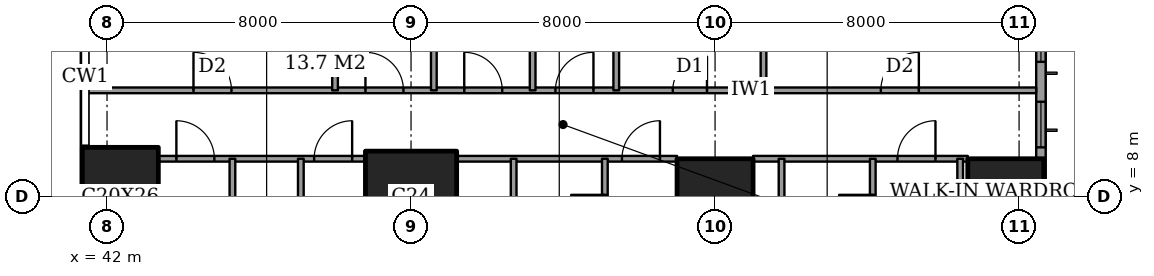
"""IFC4 building model, lengths in metres.
Left out: names, types, materials, properties, quantities, classifications, styles, units other than length and angle.
Written with IfcOpenShell. Run it as: python <this file> out.ifc"""

import sys

from ifc_helpers import new_model, si_unit, direction, frame, frame_2d, origin, origin_2d, place, context, subcontext, project, spatial, rectangle, extrude, element, fill, save


model = new_model("IFC4")
c1 = context("Model", 3, precision=1e-05, world=origin(), true_north=direction((0.0, 1.0)))
c2 = subcontext(c1, "Body", "Model", "MODEL_VIEW")
j1 = project(units=[si_unit("LENGTHUNIT", "METRE"), si_unit("PLANEANGLEUNIT", "RADIAN")], contexts=[c1])
p1 = place(None, origin())
s1 = spatial("IfcSite", under=j1, at=p1, CompositionType="ELEMENT")
p2 = place(p1, origin())
s2 = spatial("IfcBuilding", under=s1, at=p2, CompositionType="ELEMENT")
p3 = place(p2, frame((0.0, 0.0, 54.8)))
s3 = spatial("IfcBuildingStorey", under=s2, at=p3, CompositionType="ELEMENT", Elevation=54.8)
p4 = place(p3, frame((42.35, 8.0, 0.0), z_axis=(0.0, 0.0, 1.0), x_axis=(1.0, 0.0, 0.0)))
e1 = element("IfcColumn", 1, at=p4, inside=s3, PredefinedType="COLUMN", context=c2, shape_type="SweptSolid", body=[
    extrude(rectangle(XDim=2.0, YDim=2.6, at=origin_2d()), origin(), (0.0, 0.0, 1.0), 3.6),
])
p5 = place(p3, frame((50.0, 8.0, 0.0), z_axis=(0.0, 0.0, 1.0), x_axis=(1.0, 0.0, 0.0)))
e2 = element("IfcColumn", 2, at=p5, inside=s3, PredefinedType="COLUMN", context=c2, shape_type="SweptSolid", body=[
    extrude(rectangle(XDim=2.4, YDim=2.4, at=origin_2d()), origin(), (0.0, 0.0, 1.0), 3.6),
])
for number, where, z_axis, x_axis in (
    (3, (58.0, 8.0, 0.0), (0.0, 0.0, 1.0), (1.0, 0.0, 0.0)),
    (4, (65.65, 8.0, 0.0), (0.0, 0.0, 1.0), (1.0, 0.0, 0.0)),
):
    element("IfcColumn", number, at=place(p3, frame(where, z_axis=z_axis, x_axis=x_axis)), inside=s3, PredefinedType="COLUMN", context=c2, shape_type="SweptSolid", body=[
        extrude(rectangle(XDim=2.0, YDim=2.0, at=origin_2d()), origin(), (0.0, 0.0, 1.0), 3.6),
    ])
p6 = place(p3, frame((66.575, 3.175, 0.0), z_axis=(0.0, 0.0, 1.0), x_axis=(0.0, 1.0, 0.0)))
e5 = element("IfcWall", 5, at=p6, inside=s3, PredefinedType="SOLIDWALL", context=c2, shape_type="SweptSolid", body=[
    extrude(rectangle(XDim=41.65, YDim=0.25, at=frame_2d((20.825, 0.0))), origin(), (0.0, 0.0, 1.0), 3.6),
])
p7 = place(p6, frame((0.775, 0.0, 0.6)))
e6 = element("IfcOpeningElement", 6, at=p7, cuts=e5, PredefinedType="OPENING", context=c2, shape_type="SweptSolid", body=[
    extrude(rectangle(XDim=2.4, YDim=2.0, at=frame_2d((1.2, 1.0))), frame((0.0, 0.135, 0.0), z_axis=(0.0, -1.0, 0.0), x_axis=(1.0, 0.0, 0.0)), (0.0, 0.0, 1.0), 0.27),
])
p8 = place(p6, frame((6.125, 0.0, 0.6)))
e7 = element("IfcOpeningElement", 7, at=p8, cuts=e5, PredefinedType="OPENING", context=c2, shape_type="SweptSolid", body=[
    extrude(rectangle(XDim=1.2, YDim=2.0, at=frame_2d((0.6, 1.0))), frame((0.0, 0.135, 0.0), z_axis=(0.0, -1.0, 0.0), x_axis=(1.0, 0.0, 0.0)), (0.0, 0.0, 1.0), 0.27),
])
p9 = place(p6, frame((8.375, 0.0, 0.6)))
e8 = element("IfcOpeningElement", 8, at=p9, cuts=e5, PredefinedType="OPENING", context=c2, shape_type="SweptSolid", body=[
    extrude(rectangle(XDim=2.4, YDim=2.0, at=frame_2d((1.2, 1.0))), frame((0.0, 0.135, 0.0), z_axis=(0.0, -1.0, 0.0), x_axis=(1.0, 0.0, 0.0)), (0.0, 0.0, 1.0), 0.27),
])
p10 = place(p6, frame((15.775, 0.0, 0.6)))
e9 = element("IfcOpeningElement", 9, at=p10, cuts=e5, PredefinedType="OPENING", context=c2, shape_type="SweptSolid", body=[
    extrude(rectangle(XDim=2.4, YDim=2.0, at=frame_2d((1.2, 1.0))), frame((0.0, 0.135, 0.0), z_axis=(0.0, -1.0, 0.0), x_axis=(1.0, 0.0, 0.0)), (0.0, 0.0, 1.0), 0.27),
])
p11 = place(p6, frame((23.475, 0.0, 0.6)))
e10 = element("IfcOpeningElement", 10, at=p11, cuts=e5, PredefinedType="OPENING", context=c2, shape_type="SweptSolid", body=[
    extrude(rectangle(XDim=2.4, YDim=2.0, at=frame_2d((1.2, 1.0))), frame((0.0, 0.135, 0.0), z_axis=(0.0, -1.0, 0.0), x_axis=(1.0, 0.0, 0.0)), (0.0, 0.0, 1.0), 0.27),
])
p12 = place(p6, frame((30.775, 0.0, 0.6)))
e11 = element("IfcOpeningElement", 11, at=p12, cuts=e5, PredefinedType="OPENING", context=c2, shape_type="SweptSolid", body=[
    extrude(rectangle(XDim=2.4, YDim=2.0, at=frame_2d((1.2, 1.0))), frame((0.0, 0.135, 0.0), z_axis=(0.0, -1.0, 0.0), x_axis=(1.0, 0.0, 0.0)), (0.0, 0.0, 1.0), 0.27),
])
p13 = place(p6, frame((34.125, 0.0, 0.6)))
e12 = element("IfcOpeningElement", 12, at=p13, cuts=e5, PredefinedType="OPENING", context=c2, shape_type="SweptSolid", body=[
    extrude(rectangle(XDim=1.2, YDim=2.0, at=frame_2d((0.6, 1.0))), frame((0.0, 0.135, 0.0), z_axis=(0.0, -1.0, 0.0), x_axis=(1.0, 0.0, 0.0)), (0.0, 0.0, 1.0), 0.27),
])
p14 = place(p6, frame((38.475, 0.0, 0.6)))
e13 = element("IfcOpeningElement", 13, at=p14, cuts=e5, PredefinedType="OPENING", context=c2, shape_type="SweptSolid", body=[
    extrude(rectangle(XDim=2.4, YDim=2.0, at=frame_2d((1.2, 1.0))), frame((0.0, 0.135, 0.0), z_axis=(0.0, -1.0, 0.0), x_axis=(1.0, 0.0, 0.0)), (0.0, 0.0, 1.0), 0.27),
])
p15 = place(p3, frame((43.35, 9.0, 0.0), z_axis=(0.0, 0.0, 1.0), x_axis=(1.0, 0.0, 0.0)))
e14 = element("IfcWall", 14, at=p15, inside=s3, PredefinedType="PARTITIONING", context=c2, shape_type="SweptSolid", body=[
    extrude(rectangle(XDim=5.45, YDim=0.15, at=frame_2d((2.725, 0.0))), origin(), (0.0, 0.0, 1.0), 3.35),
])
p16 = place(p15, frame((4.1, 0.0, 0.0)))
e15 = element("IfcOpeningElement", 15, at=p16, cuts=e14, PredefinedType="OPENING", context=c2, shape_type="SweptSolid", body=[
    extrude(rectangle(XDim=1.0, YDim=2.1, at=frame_2d((0.5, 1.05))), frame((0.0, 0.085, 0.0), z_axis=(0.0, -1.0, 0.0), x_axis=(1.0, 0.0, 0.0)), (0.0, 0.0, 1.0), 0.17),
])
p17 = place(p15, frame((0.475, 0.0, 0.0)))
e16 = element("IfcOpeningElement", 16, at=p17, cuts=e14, PredefinedType="OPENING", context=c2, shape_type="SweptSolid", body=[
    extrude(rectangle(XDim=1.0, YDim=2.1, at=frame_2d((0.5, 1.05))), frame((0.0, 0.085, 0.0), z_axis=(0.0, -1.0, 0.0), x_axis=(1.0, 0.0, 0.0)), (0.0, 0.0, 1.0), 0.17),
])
p18 = place(p3, frame((51.2, 9.0, 0.0), z_axis=(0.0, 0.0, 1.0), x_axis=(1.0, 0.0, 0.0)))
e17 = element("IfcWall", 17, at=p18, inside=s3, PredefinedType="PARTITIONING", context=c2, shape_type="SweptSolid", body=[
    extrude(rectangle(XDim=5.8, YDim=0.15, at=frame_2d((2.9, 0.0))), origin(), (0.0, 0.0, 1.0), 3.35),
])
p19 = place(p18, frame((4.35, 0.0, 0.0)))
e18 = element("IfcOpeningElement", 18, at=p19, cuts=e17, PredefinedType="OPENING", context=c2, shape_type="SweptSolid", body=[
    extrude(rectangle(XDim=1.0, YDim=2.1, at=frame_2d((0.5, 1.05))), frame((0.0, 0.085, 0.0), z_axis=(0.0, -1.0, 0.0), x_axis=(1.0, 0.0, 0.0)), (0.0, 0.0, 1.0), 0.17),
])
p20 = place(p3, frame((59.0, 9.0, 0.0), z_axis=(0.0, 0.0, 1.0), x_axis=(1.0, 0.0, 0.0)))
e19 = element("IfcWall", 19, at=p20, inside=s3, PredefinedType="PARTITIONING", context=c2, shape_type="SweptSolid", body=[
    extrude(rectangle(XDim=5.65, YDim=0.15, at=frame_2d((2.825, 0.0))), origin(), (0.0, 0.0, 1.0), 3.35),
])
p21 = place(p20, frame((3.8, 0.0, 0.0)))
e20 = element("IfcOpeningElement", 20, at=p21, cuts=e19, PredefinedType="OPENING", context=c2, shape_type="SweptSolid", body=[
    extrude(rectangle(XDim=1.0, YDim=2.1, at=frame_2d((0.5, 1.05))), frame((0.0, 0.085, 0.0), z_axis=(0.0, -1.0, 0.0), x_axis=(1.0, 0.0, 0.0)), (0.0, 0.0, 1.0), 0.17),
])
p22 = place(p3, frame((41.439, 10.8, 0.0), z_axis=(0.0, 0.0, 1.0), x_axis=(1.0, 0.0, 0.0)))
e21 = element("IfcWall", 21, at=p22, inside=s3, PredefinedType="PARTITIONING", context=c2, shape_type="SweptSolid", body=[
    extrude(rectangle(XDim=25.011, YDim=0.15, at=frame_2d((12.505, 0.0))), origin(), (0.0, 0.0, 1.0), 3.35),
])
p23 = place(p22, frame((12.361, 0.0, 0.0)))
e22 = element("IfcOpeningElement", 22, at=p23, cuts=e21, PredefinedType="OPENING", context=c2, shape_type="SweptSolid", body=[
    extrude(rectangle(XDim=1.0, YDim=2.1, at=frame_2d((0.5, 1.05))), frame((0.0, 0.085, 0.0), z_axis=(0.0, -1.0, 0.0), x_axis=(1.0, 0.0, 0.0)), (0.0, 0.0, 1.0), 0.17),
])
p24 = place(p22, frame((20.924, 0.0, 0.0)))
e23 = element("IfcOpeningElement", 23, at=p24, cuts=e21, PredefinedType="OPENING", context=c2, shape_type="SweptSolid", body=[
    extrude(rectangle(XDim=1.0, YDim=2.1, at=frame_2d((0.5, 1.05))), frame((0.0, 0.085, 0.0), z_axis=(0.0, -1.0, 0.0), x_axis=(1.0, 0.0, 0.0)), (0.0, 0.0, 1.0), 0.17),
])
p25 = place(p22, frame((15.448, 0.0, 0.0)))
e24 = element("IfcOpeningElement", 24, at=p25, cuts=e21, PredefinedType="OPENING", context=c2, shape_type="SweptSolid", body=[
    extrude(rectangle(XDim=0.9, YDim=2.1, at=frame_2d((0.45, 1.05))), frame((0.0, 0.085, 0.0), z_axis=(0.0, -1.0, 0.0), x_axis=(1.0, 0.0, 0.0)), (0.0, 0.0, 1.0), 0.17),
])
p26 = place(p22, frame((9.961, 0.0, 0.0)))
e25 = element("IfcOpeningElement", 25, at=p26, cuts=e21, PredefinedType="OPENING", context=c2, shape_type="SweptSolid", body=[
    extrude(rectangle(XDim=1.0, YDim=2.1, at=frame_2d((0.5, 1.05))), frame((0.0, 0.085, 0.0), z_axis=(0.0, -1.0, 0.0), x_axis=(1.0, 0.0, 0.0)), (0.0, 0.0, 1.0), 0.17),
])
p27 = place(p22, frame((7.361, 0.0, 0.0)))
e26 = element("IfcOpeningElement", 26, at=p27, cuts=e21, PredefinedType="OPENING", context=c2, shape_type="SweptSolid", body=[
    extrude(rectangle(XDim=1.0, YDim=2.1, at=frame_2d((0.5, 1.05))), frame((0.0, 0.085, 0.0), z_axis=(0.0, -1.0, 0.0), x_axis=(1.0, 0.0, 0.0)), (0.0, 0.0, 1.0), 0.17),
])
p28 = place(p22, frame((2.836, 0.0, 0.0)))
e27 = element("IfcOpeningElement", 27, at=p28, cuts=e21, PredefinedType="OPENING", context=c2, shape_type="SweptSolid", body=[
    extrude(rectangle(XDim=1.0, YDim=2.1, at=frame_2d((0.5, 1.05))), frame((0.0, 0.085, 0.0), z_axis=(0.0, -1.0, 0.0), x_axis=(1.0, 0.0, 0.0)), (0.0, 0.0, 1.0), 0.17),
])
p29 = place(p3, frame((45.3, -0.45, 0.0), z_axis=(0.0, 0.0, 1.0), x_axis=(0.0, 1.0, 0.0)))
e28 = element("IfcWall", 28, at=p29, inside=s3, PredefinedType="PARTITIONING", context=c2, shape_type="SweptSolid", body=[
    extrude(rectangle(XDim=9.45, YDim=0.15, at=frame_2d((4.725, 0.0))), origin(), (0.0, 0.0, 1.0), 3.35),
])
p30 = place(p3, frame((47.1, 5.2, 0.0), z_axis=(0.0, 0.0, 1.0), x_axis=(0.0, 1.0, 0.0)))
e29 = element("IfcWall", 29, at=p30, inside=s3, PredefinedType="PARTITIONING", context=c2, shape_type="SweptSolid", body=[
    extrude(rectangle(XDim=3.8, YDim=0.15, at=frame_2d((1.9, 0.0))), origin(), (0.0, 0.0, 1.0), 3.35),
])
p31 = place(p30, frame((1.45, 0.0, 0.0)))
e30 = element("IfcOpeningElement", 30, at=p31, cuts=e29, PredefinedType="OPENING", context=c2, shape_type="SweptSolid", body=[
    extrude(rectangle(XDim=0.9, YDim=2.1, at=frame_2d((0.45, 1.05))), frame((0.0, 0.085, 0.0), z_axis=(0.0, -1.0, 0.0), x_axis=(1.0, 0.0, 0.0)), (0.0, 0.0, 1.0), 0.17),
])
p32 = place(p3, frame((48.0, 10.8, 0.0), z_axis=(0.0, 0.0, 1.0), x_axis=(0.0, 1.0, 0.0)))
e31 = element("IfcWall", 31, at=p32, inside=s3, PredefinedType="PARTITIONING", context=c2, shape_type="SweptSolid", body=[
    extrude(rectangle(XDim=6.7, YDim=0.15, at=frame_2d((3.35, 0.0))), origin(), (0.0, 0.0, 1.0), 3.35),
])
p33 = place(p3, frame((50.6, 10.8, 0.0), z_axis=(0.0, 0.0, 1.0), x_axis=(0.0, 1.0, 0.0)))
e32 = element("IfcWall", 32, at=p33, inside=s3, PredefinedType="PARTITIONING", context=c2, shape_type="SweptSolid", body=[
    extrude(rectangle(XDim=4.0, YDim=0.15, at=frame_2d((2.0, 0.0))), origin(), (0.0, 0.0, 1.0), 3.35),
])
p34 = place(p3, frame((52.7, -0.45, 0.0), z_axis=(0.0, 0.0, 1.0), x_axis=(0.0, 1.0, 0.0)))
e33 = element("IfcWall", 33, at=p34, inside=s3, PredefinedType="PARTITIONING", context=c2, shape_type="SweptSolid", body=[
    extrude(rectangle(XDim=9.45, YDim=0.15, at=frame_2d((4.725, 0.0))), origin(), (0.0, 0.0, 1.0), 3.35),
])
p35 = place(p34, frame((2.875, 0.0, 0.0)))
e34 = element("IfcOpeningElement", 34, at=p35, cuts=e33, PredefinedType="OPENING", context=c2, shape_type="SweptSolid", body=[
    extrude(rectangle(XDim=0.9, YDim=2.1, at=frame_2d((0.45, 1.05))), frame((0.0, 0.085, 0.0), z_axis=(0.0, -1.0, 0.0), x_axis=(1.0, 0.0, 0.0)), (0.0, 0.0, 1.0), 0.17),
])
p36 = place(p3, frame((53.2, 10.8, 0.0), z_axis=(0.0, 0.0, 1.0), x_axis=(0.0, 1.0, 0.0)))
e35 = element("IfcWall", 35, at=p36, inside=s3, PredefinedType="PARTITIONING", context=c2, shape_type="SweptSolid", body=[
    extrude(rectangle(XDim=6.7, YDim=0.15, at=frame_2d((3.35, 0.0))), origin(), (0.0, 0.0, 1.0), 3.35),
])
p37 = place(p3, frame((55.1, 6.2, 0.0), z_axis=(0.0, 0.0, 1.0), x_axis=(0.0, 1.0, 0.0)))
e36 = element("IfcWall", 36, at=p37, inside=s3, PredefinedType="PARTITIONING", context=c2, shape_type="SweptSolid", body=[
    extrude(rectangle(XDim=2.8, YDim=0.15, at=frame_2d((1.4, 0.0))), origin(), (0.0, 0.0, 1.0), 3.35),
])
p38 = place(p37, frame((0.95, 0.0, 0.0)))
e37 = element("IfcOpeningElement", 37, at=p38, cuts=e36, PredefinedType="OPENING", context=c2, shape_type="SweptSolid", body=[
    extrude(rectangle(XDim=0.9, YDim=2.1, at=frame_2d((0.45, 1.05))), frame((0.0, 0.085, 0.0), z_axis=(0.0, -1.0, 0.0), x_axis=(1.0, 0.0, 0.0)), (0.0, 0.0, 1.0), 0.17),
])
p39 = place(p3, frame((55.4, 10.8, 0.0), z_axis=(0.0, 0.0, 1.0), x_axis=(0.0, 1.0, 0.0)))
e38 = element("IfcWall", 38, at=p39, inside=s3, PredefinedType="PARTITIONING", context=c2, shape_type="SweptSolid", body=[
    extrude(rectangle(XDim=10.8, YDim=0.15, at=frame_2d((5.4, 0.0))), origin(), (0.0, 0.0, 1.0), 3.35),
])
p40 = place(p39, frame((8.25, 0.0, 0.0)))
e39 = element("IfcOpeningElement", 39, at=p40, cuts=e38, PredefinedType="OPENING", context=c2, shape_type="SweptSolid", body=[
    extrude(rectangle(XDim=1.0, YDim=2.1, at=frame_2d((0.5, 1.05))), frame((0.0, 0.085, 0.0), z_axis=(0.0, -1.0, 0.0), x_axis=(1.0, 0.0, 0.0)), (0.0, 0.0, 1.0), 0.17),
])
p41 = place(p3, frame((59.275, 10.8, 0.0), z_axis=(0.0, 0.0, 1.0), x_axis=(0.0, 1.0, 0.0)))
e40 = element("IfcWall", 40, at=p41, inside=s3, PredefinedType="PARTITIONING", context=c2, shape_type="SweptSolid", body=[
    extrude(rectangle(XDim=4.0, YDim=0.15, at=frame_2d((2.0, 0.0))), origin(), (0.0, 0.0, 1.0), 3.35),
])
p42 = place(p3, frame((59.75, -0.45, 0.0), z_axis=(0.0, 0.0, 1.0), x_axis=(0.0, 1.0, 0.0)))
e41 = element("IfcWall", 41, at=p42, inside=s3, PredefinedType="PARTITIONING", context=c2, shape_type="SweptSolid", body=[
    extrude(rectangle(XDim=9.45, YDim=0.15, at=frame_2d((4.725, 0.0))), origin(), (0.0, 0.0, 1.0), 3.35),
])
p43 = place(p42, frame((2.875, 0.0, 0.0)))
e42 = element("IfcOpeningElement", 42, at=p43, cuts=e41, PredefinedType="OPENING", context=c2, shape_type="SweptSolid", body=[
    extrude(rectangle(XDim=0.9, YDim=2.1, at=frame_2d((0.45, 1.05))), frame((0.0, 0.085, 0.0), z_axis=(0.0, -1.0, 0.0), x_axis=(1.0, 0.0, 0.0)), (0.0, 0.0, 1.0), 0.17),
])
p44 = place(p3, frame((62.15, 6.2, 0.0), z_axis=(0.0, 0.0, 1.0), x_axis=(0.0, 1.0, 0.0)))
e43 = element("IfcWall", 43, at=p44, inside=s3, PredefinedType="PARTITIONING", context=c2, shape_type="SweptSolid", body=[
    extrude(rectangle(XDim=2.8, YDim=0.15, at=frame_2d((1.4, 0.0))), origin(), (0.0, 0.0, 1.0), 3.35),
])
p45 = place(p44, frame((0.95, 0.0, 0.0)))
e44 = element("IfcOpeningElement", 44, at=p45, cuts=e43, PredefinedType="OPENING", context=c2, shape_type="SweptSolid", body=[
    extrude(rectangle(XDim=0.9, YDim=2.1, at=frame_2d((0.45, 1.05))), frame((0.0, 0.085, 0.0), z_axis=(0.0, -1.0, 0.0), x_axis=(1.0, 0.0, 0.0)), (0.0, 0.0, 1.0), 0.17),
])
p46 = place(p3, frame((64.45, 3.3, 0.0), z_axis=(0.0, 0.0, 1.0), x_axis=(0.0, 1.0, 0.0)))
e45 = element("IfcWall", 45, at=p46, inside=s3, PredefinedType="PARTITIONING", context=c2, shape_type="SweptSolid", body=[
    extrude(rectangle(XDim=5.7, YDim=0.15, at=frame_2d((2.85, 0.0))), origin(), (0.0, 0.0, 1.0), 3.35),
])
p47 = place(p46, frame((2.4, 0.0, 0.0)))
e46 = element("IfcOpeningElement", 46, at=p47, cuts=e45, PredefinedType="OPENING", context=c2, shape_type="SweptSolid", body=[
    extrude(rectangle(XDim=0.9, YDim=2.1, at=frame_2d((0.45, 1.05))), frame((0.0, 0.085, 0.0), z_axis=(0.0, -1.0, 0.0), x_axis=(1.0, 0.0, 0.0)), (0.0, 0.0, 1.0), 0.17),
])
p48 = place(p8, origin())
e47 = element("IfcWindow", 47, at=p48, inside=s3, PartitioningType="SINGLE_PANEL", PredefinedType="WINDOW", context=c2, shape_type="SweptSolid", body=[
    extrude(rectangle(XDim=1.2, YDim=2.0, at=frame_2d((0.6, 1.0))), frame((0.0, 0.03, 0.0), z_axis=(0.0, -1.0, 0.0), x_axis=(1.0, 0.0, 0.0)), (0.0, 0.0, 1.0), 0.06),
])
fill(e7, e47)
p49 = place(p9, origin())
e48 = element("IfcWindow", 48, at=p49, inside=s3, PartitioningType="SINGLE_PANEL", PredefinedType="WINDOW", context=c2, shape_type="SweptSolid", body=[
    extrude(rectangle(XDim=2.4, YDim=2.0, at=frame_2d((1.2, 1.0))), frame((0.0, 0.03, 0.0), z_axis=(0.0, -1.0, 0.0), x_axis=(1.0, 0.0, 0.0)), (0.0, 0.0, 1.0), 0.06),
])
fill(e8, e48)
p50 = place(p45, origin())
e49 = element("IfcDoor", 49, at=p50, inside=s3, OperationType="SINGLE_SWING_LEFT", PredefinedType="DOOR", context=c2, shape_type="SweptSolid", body=[
    extrude(rectangle(XDim=0.9, YDim=2.1, at=frame_2d((0.45, 1.05))), frame((0.0, 0.025, 0.0), z_axis=(0.0, -1.0, 0.0), x_axis=(1.0, 0.0, 0.0)), (0.0, 0.0, 1.0), 0.05),
])
fill(e44, e49)
p51 = place(p21, origin())
e50 = element("IfcDoor", 50, at=p51, inside=s3, OperationType="SINGLE_SWING_LEFT", PredefinedType="DOOR", context=c2, shape_type="SweptSolid", body=[
    extrude(rectangle(XDim=1.0, YDim=2.1, at=frame_2d((0.5, 1.05))), frame((0.0, 0.025, 0.0), z_axis=(0.0, -1.0, 0.0), x_axis=(1.0, 0.0, 0.0)), (0.0, 0.0, 1.0), 0.05),
])
fill(e20, e50)
p52 = place(p38, origin())
e51 = element("IfcDoor", 51, at=p52, inside=s3, OperationType="SINGLE_SWING_LEFT", PredefinedType="DOOR", context=c2, shape_type="SweptSolid", body=[
    extrude(rectangle(XDim=0.9, YDim=2.1, at=frame_2d((0.45, 1.05))), frame((0.0, 0.025, 0.0), z_axis=(0.0, -1.0, 0.0), x_axis=(1.0, 0.0, 0.0)), (0.0, 0.0, 1.0), 0.05),
])
fill(e37, e51)
p53 = place(p19, origin())
e52 = element("IfcDoor", 52, at=p53, inside=s3, OperationType="SINGLE_SWING_LEFT", PredefinedType="DOOR", context=c2, shape_type="SweptSolid", body=[
    extrude(rectangle(XDim=1.0, YDim=2.1, at=frame_2d((0.5, 1.05))), frame((0.0, 0.025, 0.0), z_axis=(0.0, -1.0, 0.0), x_axis=(1.0, 0.0, 0.0)), (0.0, 0.0, 1.0), 0.05),
])
fill(e18, e52)
p54 = place(p16, origin())
e53 = element("IfcDoor", 53, at=p54, inside=s3, OperationType="SINGLE_SWING_LEFT", PredefinedType="DOOR", context=c2, shape_type="SweptSolid", body=[
    extrude(rectangle(XDim=1.0, YDim=2.1, at=frame_2d((0.5, 1.05))), frame((0.0, 0.025, 0.0), z_axis=(0.0, -1.0, 0.0), x_axis=(1.0, 0.0, 0.0)), (0.0, 0.0, 1.0), 0.05),
])
fill(e15, e53)
p55 = place(p17, origin())
e54 = element("IfcDoor", 54, at=p55, inside=s3, OperationType="SINGLE_SWING_RIGHT", PredefinedType="DOOR", context=c2, shape_type="SweptSolid", body=[
    extrude(rectangle(XDim=1.0, YDim=2.1, at=frame_2d((0.5, 1.05))), frame((0.0, 0.025, 0.0), z_axis=(0.0, -1.0, 0.0), x_axis=(1.0, 0.0, 0.0)), (0.0, 0.0, 1.0), 0.05),
])
fill(e16, e54)
p56 = place(p23, origin())
e55 = element("IfcDoor", 55, at=p56, inside=s3, OperationType="SINGLE_SWING_LEFT", PredefinedType="DOOR", context=c2, shape_type="SweptSolid", body=[
    extrude(rectangle(XDim=1.0, YDim=2.1, at=frame_2d((0.5, 1.05))), frame((0.0, 0.025, 0.0), z_axis=(0.0, -1.0, 0.0), x_axis=(1.0, 0.0, 0.0)), (0.0, 0.0, 1.0), 0.05),
])
fill(e22, e55)
p57 = place(p24, origin())
e56 = element("IfcDoor", 56, at=p57, inside=s3, OperationType="SINGLE_SWING_LEFT", PredefinedType="DOOR", context=c2, shape_type="SweptSolid", body=[
    extrude(rectangle(XDim=1.0, YDim=2.1, at=frame_2d((0.5, 1.05))), frame((0.0, 0.025, 0.0), z_axis=(0.0, -1.0, 0.0), x_axis=(1.0, 0.0, 0.0)), (0.0, 0.0, 1.0), 0.05),
])
fill(e23, e56)
p58 = place(p25, origin())
e57 = element("IfcDoor", 57, at=p58, inside=s3, OperationType="SINGLE_SWING_LEFT", PredefinedType="DOOR", context=c2, shape_type="SweptSolid", body=[
    extrude(rectangle(XDim=0.9, YDim=2.1, at=frame_2d((0.45, 1.05))), frame((0.0, 0.025, 0.0), z_axis=(0.0, -1.0, 0.0), x_axis=(1.0, 0.0, 0.0)), (0.0, 0.0, 1.0), 0.05),
])
fill(e24, e57)
p59 = place(p26, origin())
e58 = element("IfcDoor", 58, at=p59, inside=s3, OperationType="SINGLE_SWING_RIGHT", PredefinedType="DOOR", context=c2, shape_type="SweptSolid", body=[
    extrude(rectangle(XDim=1.0, YDim=2.1, at=frame_2d((0.5, 1.05))), frame((0.0, 0.025, 0.0), z_axis=(0.0, -1.0, 0.0), x_axis=(1.0, 0.0, 0.0)), (0.0, 0.0, 1.0), 0.05),
])
fill(e25, e58)
p60 = place(p27, origin())
e59 = element("IfcDoor", 59, at=p60, inside=s3, OperationType="SINGLE_SWING_RIGHT", PredefinedType="DOOR", context=c2, shape_type="SweptSolid", body=[
    extrude(rectangle(XDim=1.0, YDim=2.1, at=frame_2d((0.5, 1.05))), frame((0.0, 0.025, 0.0), z_axis=(0.0, -1.0, 0.0), x_axis=(1.0, 0.0, 0.0)), (0.0, 0.0, 1.0), 0.05),
])
fill(e26, e59)
p61 = place(p28, origin())
e60 = element("IfcDoor", 60, at=p61, inside=s3, OperationType="SINGLE_SWING_RIGHT", PredefinedType="DOOR", context=c2, shape_type="SweptSolid", body=[
    extrude(rectangle(XDim=1.0, YDim=2.1, at=frame_2d((0.5, 1.05))), frame((0.0, 0.025, 0.0), z_axis=(0.0, -1.0, 0.0), x_axis=(1.0, 0.0, 0.0)), (0.0, 0.0, 1.0), 0.05),
])
fill(e27, e60)
save(model, sys.argv[1])
